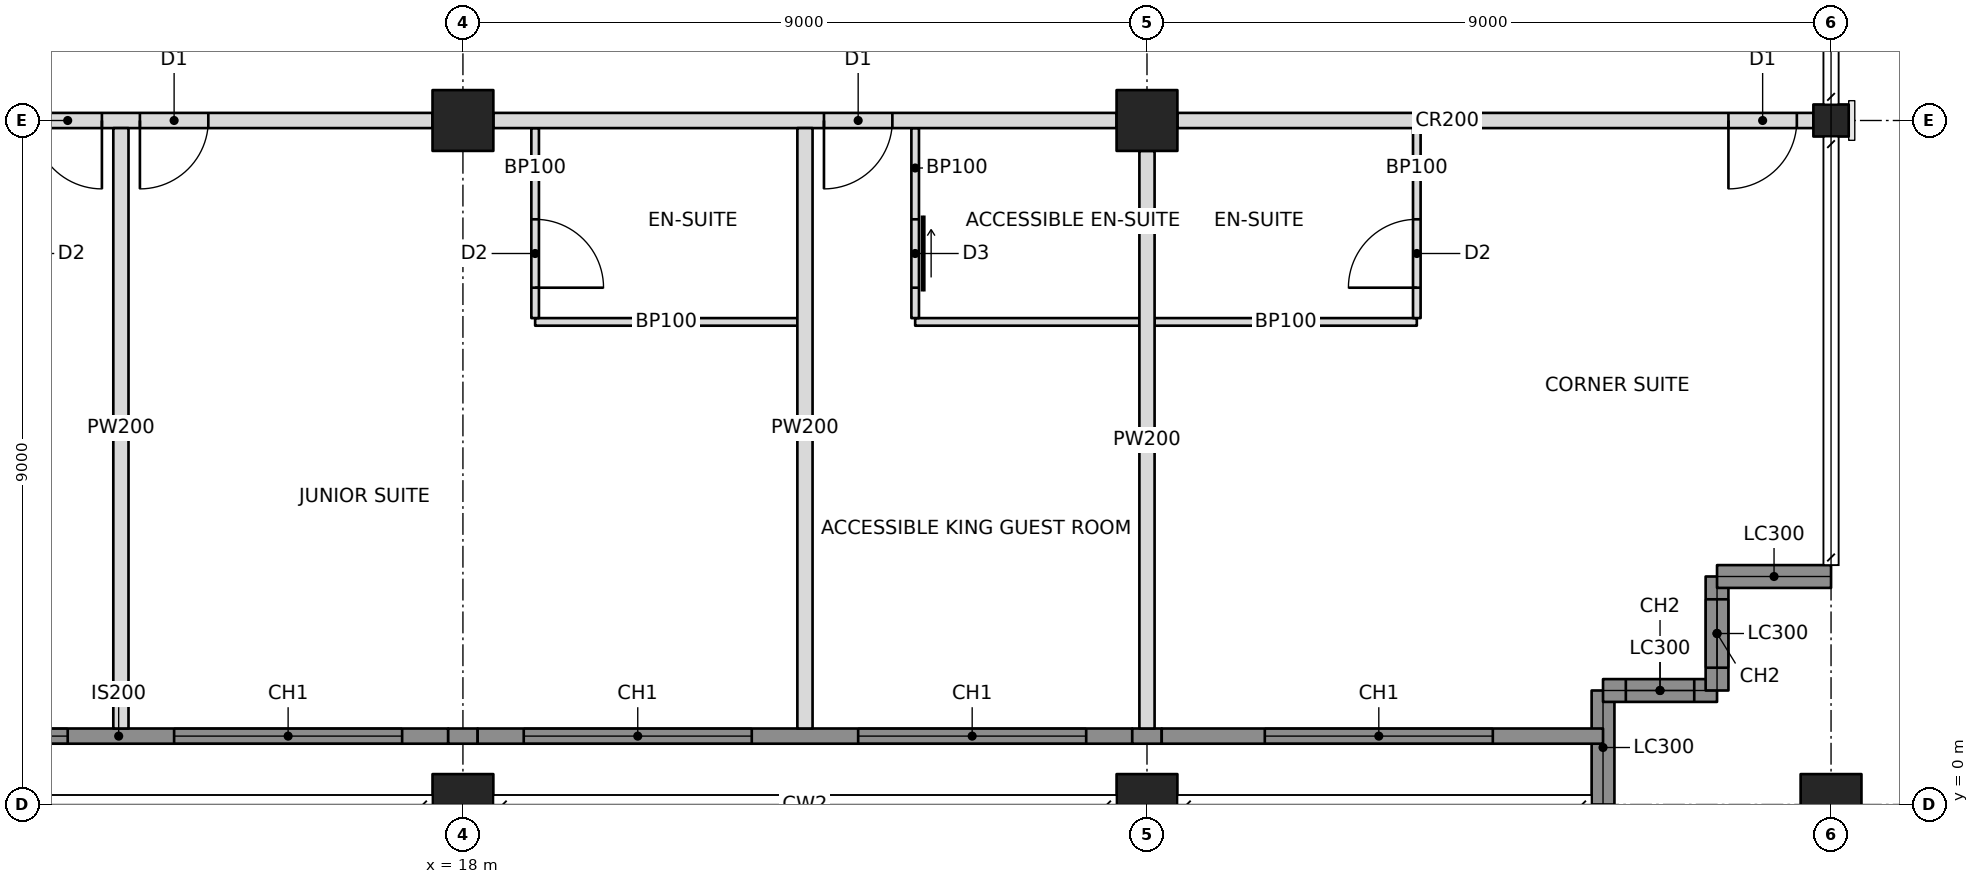
"""IFC4 building model, lengths in metres.
Left out: names, types, materials, properties, quantities, classifications, styles, units other than length and angle.
Written with IfcOpenShell. Run it as: python <this file> out.ifc"""

import sys

from ifc_helpers import new_model, si_unit, direction, frame, frame_2d, origin, origin_2d, place, context, subcontext, project, spatial, rectangle, hollow_rectangle, i_section, extrude, element, fill, save


model = new_model("IFC4")
c1 = context("Model", 3, precision=1e-05, world=origin(), true_north=direction((0.0, 1.0)))
c2 = subcontext(c1, "Body", "Model", "MODEL_VIEW")
j1 = project(units=[si_unit("LENGTHUNIT", "METRE"), si_unit("PLANEANGLEUNIT", "RADIAN")], contexts=[c1])
p1 = place(None, origin())
s1 = spatial("IfcSite", under=j1, at=p1, CompositionType="ELEMENT")
p2 = place(p1, origin())
s2 = spatial("IfcBuilding", under=s1, at=p2, CompositionType="ELEMENT")
p3 = place(p2, frame((0.0, 0.0, 230.2)))
s3 = spatial("IfcBuildingStorey", under=s2, at=p3, CompositionType="ELEMENT", Elevation=230.2)
p4 = place(p3, frame((18.0, 0.0, 0.0), z_axis=(0.0, 0.0, 1.0), x_axis=(1.0, 0.0, 0.0)))
e1 = element("IfcColumn", 1, at=p4, inside=s3, PredefinedType="COLUMN", context=c2, shape_type="SweptSolid", body=[
    extrude(hollow_rectangle(XDim=0.8, YDim=0.8, WallThickness=0.05, at=origin_2d()), origin(), (0.0, 0.0, 1.0), 3.6),
])
p5 = place(p3, frame((18.0, 9.0, 0.0), z_axis=(0.0, 0.0, 1.0), x_axis=(1.0, 0.0, 0.0)))
e2 = element("IfcColumn", 2, at=p5, inside=s3, PredefinedType="COLUMN", context=c2, shape_type="SweptSolid", body=[
    extrude(hollow_rectangle(XDim=0.8, YDim=0.8, WallThickness=0.1, at=origin_2d()), origin(), (0.0, 0.0, 1.0), 3.6),
])
p6 = place(p3, frame((27.0, 0.0, 0.0), z_axis=(0.0, 0.0, 1.0), x_axis=(1.0, 0.0, 0.0)))
e3 = element("IfcColumn", 3, at=p6, inside=s3, PredefinedType="COLUMN", context=c2, shape_type="SweptSolid", body=[
    extrude(hollow_rectangle(XDim=0.8, YDim=0.8, WallThickness=0.05, at=origin_2d()), origin(), (0.0, 0.0, 1.0), 3.6),
])
p7 = place(p3, frame((27.0, 9.0, 0.0), z_axis=(0.0, 0.0, 1.0), x_axis=(1.0, 0.0, 0.0)))
e4 = element("IfcColumn", 4, at=p7, inside=s3, PredefinedType="COLUMN", context=c2, shape_type="SweptSolid", body=[
    extrude(hollow_rectangle(XDim=0.8, YDim=0.8, WallThickness=0.1, at=origin_2d()), origin(), (0.0, 0.0, 1.0), 3.6),
])
p8 = place(p3, frame((36.0, 0.0, 0.0), z_axis=(0.0, 0.0, 1.0), x_axis=(1.0, 0.0, 0.0)))
e5 = element("IfcColumn", 5, at=p8, inside=s3, PredefinedType="COLUMN", context=c2, shape_type="SweptSolid", body=[
    extrude(hollow_rectangle(XDim=0.8, YDim=0.8, WallThickness=0.05, at=origin_2d()), origin(), (0.0, 0.0, 1.0), 3.6),
])
p9 = place(p3, frame((36.0, 9.0, 0.0), z_axis=(0.0, 0.0, 1.0), x_axis=(0.0, 1.0, 0.0)))
e6 = element("IfcColumn", 6, at=p9, inside=s3, PredefinedType="COLUMN", context=c2, shape_type="SweptSolid", body=[
    extrude(i_section(OverallWidth=0.422, OverallDepth=0.465, WebThickness=0.045, FlangeThickness=0.073, at=origin_2d()), origin(), (0.0, 0.0, 1.0), 3.6),
])
p10 = place(p3, frame((33.0, 0.0, 0.0), z_axis=(0.0, 0.0, 1.0), x_axis=(0.0, 1.0, 0.0)))
e7 = element("IfcWall", 7, at=p10, inside=s3, PredefinedType="SOLIDWALL", context=c2, shape_type="SweptSolid", body=[
    extrude(rectangle(XDim=1.5, YDim=0.3, at=frame_2d((0.75, 0.0))), origin(), (0.0, 0.0, 1.0), 2.62),
])
p11 = place(p3, frame((33.0, 1.5, 0.0), z_axis=(0.0, 0.0, 1.0), x_axis=(1.0, 0.0, 0.0)))
e8 = element("IfcWall", 8, at=p11, inside=s3, PredefinedType="SOLIDWALL", context=c2, shape_type="SweptSolid", body=[
    extrude(rectangle(XDim=1.5, YDim=0.3, at=frame_2d((0.75, 0.0))), origin(), (0.0, 0.0, 1.0), 3.4),
])
p12 = place(p11, frame((0.3, 0.0, 0.6)))
e9 = element("IfcOpeningElement", 9, at=p12, cuts=e8, PredefinedType="OPENING", context=c2, shape_type="SweptSolid", body=[
    extrude(rectangle(XDim=0.9, YDim=2.2, at=frame_2d((0.45, 1.1))), frame((0.0, 0.16, 0.0), z_axis=(0.0, -1.0, 0.0), x_axis=(1.0, 0.0, 0.0)), (0.0, 0.0, 1.0), 0.32),
])
p13 = place(p3, frame((34.5, 1.5, 0.0), z_axis=(0.0, 0.0, 1.0), x_axis=(0.0, 1.0, 0.0)))
e10 = element("IfcWall", 10, at=p13, inside=s3, PredefinedType="SOLIDWALL", context=c2, shape_type="SweptSolid", body=[
    extrude(rectangle(XDim=1.5, YDim=0.3, at=frame_2d((0.75, 0.0))), origin(), (0.0, 0.0, 1.0), 3.4),
])
p14 = place(p13, frame((0.3, 0.0, 0.6)))
e11 = element("IfcOpeningElement", 11, at=p14, cuts=e10, PredefinedType="OPENING", context=c2, shape_type="SweptSolid", body=[
    extrude(rectangle(XDim=0.9, YDim=2.2, at=frame_2d((0.45, 1.1))), frame((0.0, 0.16, 0.0), z_axis=(0.0, -1.0, 0.0), x_axis=(1.0, 0.0, 0.0)), (0.0, 0.0, 1.0), 0.32),
])
p15 = place(p3, frame((34.5, 3.0, 0.0), z_axis=(0.0, 0.0, 1.0), x_axis=(1.0, 0.0, 0.0)))
e12 = element("IfcWall", 12, at=p15, inside=s3, PredefinedType="SOLIDWALL", context=c2, shape_type="SweptSolid", body=[
    extrude(rectangle(XDim=1.5, YDim=0.3, at=frame_2d((0.75, 0.0))), origin(), (0.0, 0.0, 1.0), 2.62),
])
p16 = place(p3, frame((9.4, 9.0, 0.0), z_axis=(0.0, 0.0, 1.0), x_axis=(1.0, 0.0, 0.0)))
e13 = element("IfcWall", 13, at=p16, inside=s3, PredefinedType="PARTITIONING", context=c2, shape_type="SweptSolid", body=[
    extrude(rectangle(XDim=8.2, YDim=0.2, at=frame_2d((4.1, 0.0))), origin(), (0.0, 0.0, 1.0), 2.605),
])
p17 = place(p16, frame((2.95, 0.0, 0.0)))
e14 = element("IfcOpeningElement", 14, at=p17, cuts=e13, PredefinedType="OPENING", context=c2, shape_type="SweptSolid", body=[
    extrude(rectangle(XDim=0.9, YDim=2.1, at=frame_2d((0.45, 1.05))), frame((0.0, 0.11, 0.0), z_axis=(0.0, -1.0, 0.0), x_axis=(1.0, 0.0, 0.0)), (0.0, 0.0, 1.0), 0.22),
])
p18 = place(p16, frame((4.35, 0.0, 0.0)))
e15 = element("IfcOpeningElement", 15, at=p18, cuts=e13, PredefinedType="OPENING", context=c2, shape_type="SweptSolid", body=[
    extrude(rectangle(XDim=0.9, YDim=2.1, at=frame_2d((0.45, 1.05))), frame((0.0, 0.11, 0.0), z_axis=(0.0, -1.0, 0.0), x_axis=(1.0, 0.0, 0.0)), (0.0, 0.0, 1.0), 0.22),
])
p19 = place(p3, frame((18.4, 9.0, 0.0), z_axis=(0.0, 0.0, 1.0), x_axis=(1.0, 0.0, 0.0)))
e16 = element("IfcWall", 16, at=p19, inside=s3, PredefinedType="PARTITIONING", context=c2, shape_type="SweptSolid", body=[
    extrude(rectangle(XDim=8.2, YDim=0.2, at=frame_2d((4.1, 0.0))), origin(), (0.0, 0.0, 1.0), 2.605),
])
p20 = place(p19, frame((4.35, 0.0, 0.0)))
e17 = element("IfcOpeningElement", 17, at=p20, cuts=e16, PredefinedType="OPENING", context=c2, shape_type="SweptSolid", body=[
    extrude(rectangle(XDim=0.9, YDim=2.1, at=frame_2d((0.45, 1.05))), frame((0.0, 0.11, 0.0), z_axis=(0.0, -1.0, 0.0), x_axis=(1.0, 0.0, 0.0)), (0.0, 0.0, 1.0), 0.22),
])
p21 = place(p3, frame((27.4, 9.0, 0.0), z_axis=(0.0, 0.0, 1.0), x_axis=(1.0, 0.0, 0.0)))
e18 = element("IfcWall", 18, at=p21, inside=s3, PredefinedType="PARTITIONING", context=c2, shape_type="SweptSolid", body=[
    extrude(rectangle(XDim=8.368, YDim=0.2, at=frame_2d((4.184, 0.0))), origin(), (0.0, 0.0, 1.0), 2.605),
])
p22 = place(p21, frame((7.25, 0.0, 0.0)))
e19 = element("IfcOpeningElement", 19, at=p22, cuts=e18, PredefinedType="OPENING", context=c2, shape_type="SweptSolid", body=[
    extrude(rectangle(XDim=0.9, YDim=2.1, at=frame_2d((0.45, 1.05))), frame((0.0, 0.11, 0.0), z_axis=(0.0, -1.0, 0.0), x_axis=(1.0, 0.0, 0.0)), (0.0, 0.0, 1.0), 0.22),
])
for number, where, z_axis, x_axis in (
    (20, (13.5, 8.9, 0.0), (0.0, 0.0, 1.0), (0.0, -1.0, 0.0)),
    (21, (22.5, 8.9, 0.0), (0.0, 0.0, 1.0), (0.0, -1.0, 0.0)),
):
    element("IfcWall", number, at=place(p3, frame(where, z_axis=z_axis, x_axis=x_axis)), inside=s3, PredefinedType="PARTITIONING", context=c2, shape_type="SweptSolid", body=[
        extrude(rectangle(XDim=7.9, YDim=0.2, at=frame_2d((3.95, 0.0))), origin(), (0.0, 0.0, 1.0), 2.604),
    ])
p23 = place(p3, frame((27.0, 8.6, 0.0), z_axis=(0.0, 0.0, 1.0), x_axis=(0.0, -1.0, 0.0)))
e22 = element("IfcWall", 22, at=p23, inside=s3, PredefinedType="PARTITIONING", context=c2, shape_type="SweptSolid", body=[
    extrude(rectangle(XDim=7.6, YDim=0.2, at=frame_2d((3.8, 0.0))), origin(), (0.0, 0.0, 1.0), 2.605),
])
p24 = place(p3, frame((18.95, 6.35, 0.0), z_axis=(0.0, 0.0, 1.0), x_axis=(1.0, 0.0, 0.0)))
e23 = element("IfcWall", 23, at=p24, inside=s3, PredefinedType="PARTITIONING", context=c2, shape_type="SweptSolid", body=[
    extrude(rectangle(XDim=3.45, YDim=0.1, at=frame_2d((1.725, 0.0))), origin(), (0.0, 0.0, 1.0), 3.4),
])
p25 = place(p3, frame((18.95, 8.9, 0.0), z_axis=(0.0, 0.0, 1.0), x_axis=(0.0, -1.0, 0.0)))
e24 = element("IfcWall", 24, at=p25, inside=s3, PredefinedType="PARTITIONING", context=c2, shape_type="SweptSolid", body=[
    extrude(rectangle(XDim=2.5, YDim=0.1, at=frame_2d((1.25, 0.0))), origin(), (0.0, 0.0, 1.0), 2.604),
])
p26 = place(p25, frame((1.2, 0.0, 0.0)))
e25 = element("IfcOpeningElement", 25, at=p26, cuts=e24, PredefinedType="OPENING", context=c2, shape_type="SweptSolid", body=[
    extrude(rectangle(XDim=0.9, YDim=2.1, at=frame_2d((0.45, 1.05))), frame((0.0, 0.06, 0.0), z_axis=(0.0, -1.0, 0.0), x_axis=(1.0, 0.0, 0.0)), (0.0, 0.0, 1.0), 0.12),
])
p27 = place(p3, frame((23.95, 6.35, 0.0), z_axis=(0.0, 0.0, 1.0), x_axis=(1.0, 0.0, 0.0)))
e26 = element("IfcWall", 26, at=p27, inside=s3, PredefinedType="PARTITIONING", context=c2, shape_type="SweptSolid", body=[
    extrude(rectangle(XDim=2.95, YDim=0.1, at=frame_2d((1.475, 0.0))), origin(), (0.0, 0.0, 1.0), 2.604),
])
p28 = place(p3, frame((23.95, 8.9, 0.0), z_axis=(0.0, 0.0, 1.0), x_axis=(0.0, -1.0, 0.0)))
e27 = element("IfcWall", 27, at=p28, inside=s3, PredefinedType="PARTITIONING", context=c2, shape_type="SweptSolid", body=[
    extrude(rectangle(XDim=2.5, YDim=0.1, at=frame_2d((1.25, 0.0))), origin(), (0.0, 0.0, 1.0), 2.604),
])
p29 = place(p28, frame((1.2, 0.0, 0.0)))
e28 = element("IfcOpeningElement", 28, at=p29, cuts=e27, PredefinedType="OPENING", context=c2, shape_type="SweptSolid", body=[
    extrude(rectangle(XDim=0.9, YDim=2.1, at=frame_2d((0.45, 1.05))), frame((0.0, 0.06, 0.0), z_axis=(0.0, -1.0, 0.0), x_axis=(1.0, 0.0, 0.0)), (0.0, 0.0, 1.0), 0.12),
])
p30 = place(p3, frame((27.1, 6.35, 0.0), z_axis=(0.0, 0.0, 1.0), x_axis=(1.0, 0.0, 0.0)))
e29 = element("IfcWall", 29, at=p30, inside=s3, PredefinedType="PARTITIONING", context=c2, shape_type="SweptSolid", body=[
    extrude(rectangle(XDim=3.45, YDim=0.1, at=frame_2d((1.725, 0.0))), origin(), (0.0, 0.0, 1.0), 2.604),
])
p31 = place(p3, frame((30.55, 8.9, 0.0), z_axis=(0.0, 0.0, 1.0), x_axis=(0.0, -1.0, 0.0)))
e30 = element("IfcWall", 30, at=p31, inside=s3, PredefinedType="PARTITIONING", context=c2, shape_type="SweptSolid", body=[
    extrude(rectangle(XDim=2.5, YDim=0.1, at=frame_2d((1.25, 0.0))), origin(), (0.0, 0.0, 1.0), 2.604),
])
p32 = place(p31, frame((1.2, 0.0, 0.0)))
e31 = element("IfcOpeningElement", 31, at=p32, cuts=e30, PredefinedType="OPENING", context=c2, shape_type="SweptSolid", body=[
    extrude(rectangle(XDim=0.9, YDim=2.1, at=frame_2d((0.45, 1.05))), frame((0.0, 0.06, 0.0), z_axis=(0.0, -1.0, 0.0), x_axis=(1.0, 0.0, 0.0)), (0.0, 0.0, 1.0), 0.12),
])
p33 = place(p3, frame((9.135, 0.9, 0.0), z_axis=(0.0, 0.0, 1.0), x_axis=(1.0, 0.0, 0.0)))
e32 = element("IfcWall", 32, at=p33, inside=s3, PredefinedType="SOLIDWALL", context=c2, shape_type="SweptSolid", body=[
    extrude(rectangle(XDim=8.671, YDim=0.2, at=frame_2d((4.335, 0.0))), origin(), (0.0, 0.0, 1.0), 3.4),
])
p34 = place(p33, frame((0.665, 0.0, 0.6)))
e33 = element("IfcOpeningElement", 33, at=p34, cuts=e32, PredefinedType="OPENING", context=c2, shape_type="SweptSolid", body=[
    extrude(rectangle(XDim=3.0, YDim=2.2, at=frame_2d((1.5, 1.1))), frame((0.0, 0.11, 0.0), z_axis=(0.0, -1.0, 0.0), x_axis=(1.0, 0.0, 0.0)), (0.0, 0.0, 1.0), 0.22),
])
p35 = place(p33, frame((5.065, 0.0, 0.6)))
e34 = element("IfcOpeningElement", 34, at=p35, cuts=e32, PredefinedType="OPENING", context=c2, shape_type="SweptSolid", body=[
    extrude(rectangle(XDim=3.0, YDim=2.2, at=frame_2d((1.5, 1.1))), frame((0.0, 0.11, 0.0), z_axis=(0.0, -1.0, 0.0), x_axis=(1.0, 0.0, 0.0)), (0.0, 0.0, 1.0), 0.22),
])
p36 = place(p3, frame((17.806, 0.9, 0.0), z_axis=(0.0, 0.0, 1.0), x_axis=(1.0, 0.0, 0.0)))
e35 = element("IfcWall", 35, at=p36, inside=s3, PredefinedType="SOLIDWALL", context=c2, shape_type="SweptSolid", body=[
    extrude(rectangle(XDim=0.388, YDim=0.2, at=frame_2d((0.194, 0.0))), origin(), (0.0, 0.0, 1.0), 2.604),
])
p37 = place(p3, frame((18.194, 0.9, 0.0), z_axis=(0.0, 0.0, 1.0), x_axis=(1.0, 0.0, 0.0)))
e36 = element("IfcWall", 36, at=p37, inside=s3, PredefinedType="SOLIDWALL", context=c2, shape_type="SweptSolid", body=[
    extrude(rectangle(XDim=8.612, YDim=0.2, at=frame_2d((4.306, 0.0))), origin(), (0.0, 0.0, 1.0), 3.4),
])
p38 = place(p37, frame((0.606, 0.0, 0.6)))
e37 = element("IfcOpeningElement", 37, at=p38, cuts=e36, PredefinedType="OPENING", context=c2, shape_type="SweptSolid", body=[
    extrude(rectangle(XDim=3.0, YDim=2.2, at=frame_2d((1.5, 1.1))), frame((0.0, 0.11, 0.0), z_axis=(0.0, -1.0, 0.0), x_axis=(1.0, 0.0, 0.0)), (0.0, 0.0, 1.0), 0.22),
])
p39 = place(p37, frame((5.006, 0.0, 0.6)))
e38 = element("IfcOpeningElement", 38, at=p39, cuts=e36, PredefinedType="OPENING", context=c2, shape_type="SweptSolid", body=[
    extrude(rectangle(XDim=3.0, YDim=2.2, at=frame_2d((1.5, 1.1))), frame((0.0, 0.11, 0.0), z_axis=(0.0, -1.0, 0.0), x_axis=(1.0, 0.0, 0.0)), (0.0, 0.0, 1.0), 0.22),
])
p40 = place(p3, frame((26.806, 0.9, 0.0), z_axis=(0.0, 0.0, 1.0), x_axis=(1.0, 0.0, 0.0)))
e39 = element("IfcWall", 39, at=p40, inside=s3, PredefinedType="SOLIDWALL", context=c2, shape_type="SweptSolid", body=[
    extrude(rectangle(XDim=0.388, YDim=0.2, at=frame_2d((0.194, 0.0))), origin(), (0.0, 0.0, 1.0), 2.604),
])
p41 = place(p3, frame((27.194, 0.9, 0.0), z_axis=(0.0, 0.0, 1.0), x_axis=(1.0, 0.0, 0.0)))
e40 = element("IfcWall", 40, at=p41, inside=s3, PredefinedType="SOLIDWALL", context=c2, shape_type="SweptSolid", body=[
    extrude(rectangle(XDim=5.806, YDim=0.2, at=frame_2d((2.903, 0.0))), origin(), (0.0, 0.0, 1.0), 3.4),
])
p42 = place(p41, frame((1.356, 0.0, 0.6)))
e41 = element("IfcOpeningElement", 41, at=p42, cuts=e40, PredefinedType="OPENING", context=c2, shape_type="SweptSolid", body=[
    extrude(rectangle(XDim=3.0, YDim=2.2, at=frame_2d((1.5, 1.1))), frame((0.0, 0.11, 0.0), z_axis=(0.0, -1.0, 0.0), x_axis=(1.0, 0.0, 0.0)), (0.0, 0.0, 1.0), 0.22),
])
p43 = place(p12, origin())
e42 = element("IfcWindow", 42, at=p43, inside=s3, PartitioningType="SINGLE_PANEL", PredefinedType="WINDOW", context=c2, shape_type="SweptSolid", body=[
    extrude(rectangle(XDim=0.9, YDim=2.2, at=frame_2d((0.45, 1.1))), frame((0.0, 0.03, 0.0), z_axis=(0.0, -1.0, 0.0), x_axis=(1.0, 0.0, 0.0)), (0.0, 0.0, 1.0), 0.06),
])
fill(e9, e42)
p44 = place(p14, origin())
e43 = element("IfcWindow", 43, at=p44, inside=s3, PartitioningType="SINGLE_PANEL", PredefinedType="WINDOW", context=c2, shape_type="SweptSolid", body=[
    extrude(rectangle(XDim=0.9, YDim=2.2, at=frame_2d((0.45, 1.1))), frame((0.0, 0.03, 0.0), z_axis=(0.0, -1.0, 0.0), x_axis=(1.0, 0.0, 0.0)), (0.0, 0.0, 1.0), 0.06),
])
fill(e11, e43)
p45 = place(p34, origin())
e44 = element("IfcWindow", 44, at=p45, inside=s3, PartitioningType="TRIPLE_PANEL_VERTICAL", PredefinedType="WINDOW", context=c2, shape_type="SweptSolid", body=[
    extrude(rectangle(XDim=3.0, YDim=2.2, at=frame_2d((1.5, 1.1))), frame((0.0, 0.03, 0.0), z_axis=(0.0, -1.0, 0.0), x_axis=(1.0, 0.0, 0.0)), (0.0, 0.0, 1.0), 0.06),
])
fill(e33, e44)
p46 = place(p35, origin())
e45 = element("IfcWindow", 45, at=p46, inside=s3, PartitioningType="TRIPLE_PANEL_VERTICAL", PredefinedType="WINDOW", context=c2, shape_type="SweptSolid", body=[
    extrude(rectangle(XDim=3.0, YDim=2.2, at=frame_2d((1.5, 1.1))), frame((0.0, 0.03, 0.0), z_axis=(0.0, -1.0, 0.0), x_axis=(1.0, 0.0, 0.0)), (0.0, 0.0, 1.0), 0.06),
])
fill(e34, e45)
p47 = place(p38, origin())
e46 = element("IfcWindow", 46, at=p47, inside=s3, PartitioningType="TRIPLE_PANEL_VERTICAL", PredefinedType="WINDOW", context=c2, shape_type="SweptSolid", body=[
    extrude(rectangle(XDim=3.0, YDim=2.2, at=frame_2d((1.5, 1.1))), frame((0.0, 0.03, 0.0), z_axis=(0.0, -1.0, 0.0), x_axis=(1.0, 0.0, 0.0)), (0.0, 0.0, 1.0), 0.06),
])
fill(e37, e46)
p48 = place(p39, origin())
e47 = element("IfcWindow", 47, at=p48, inside=s3, PartitioningType="TRIPLE_PANEL_VERTICAL", PredefinedType="WINDOW", context=c2, shape_type="SweptSolid", body=[
    extrude(rectangle(XDim=3.0, YDim=2.2, at=frame_2d((1.5, 1.1))), frame((0.0, 0.03, 0.0), z_axis=(0.0, -1.0, 0.0), x_axis=(1.0, 0.0, 0.0)), (0.0, 0.0, 1.0), 0.06),
])
fill(e38, e47)
p49 = place(p42, origin())
e48 = element("IfcWindow", 48, at=p49, inside=s3, PartitioningType="TRIPLE_PANEL_VERTICAL", PredefinedType="WINDOW", context=c2, shape_type="SweptSolid", body=[
    extrude(rectangle(XDim=3.0, YDim=2.2, at=frame_2d((1.5, 1.1))), frame((0.0, 0.03, 0.0), z_axis=(0.0, -1.0, 0.0), x_axis=(1.0, 0.0, 0.0)), (0.0, 0.0, 1.0), 0.06),
])
fill(e41, e48)
p50 = place(p17, frame((0.9, 0.0, 0.0), z_axis=(0.0, 0.0, 1.0), x_axis=(-1.0, 0.0, 0.0)))
e49 = element("IfcDoor", 49, at=p50, inside=s3, OperationType="SINGLE_SWING_LEFT", PredefinedType="DOOR", context=c2, shape_type="SweptSolid", body=[
    extrude(rectangle(XDim=0.9, YDim=2.1, at=frame_2d((0.45, 1.05))), frame((0.0, 0.025, 0.0), z_axis=(0.0, -1.0, 0.0), x_axis=(1.0, 0.0, 0.0)), (0.0, 0.0, 1.0), 0.05),
])
fill(e14, e49)
p51 = place(p26, origin())
e50 = element("IfcDoor", 50, at=p51, inside=s3, OperationType="SINGLE_SWING_RIGHT", PredefinedType="DOOR", context=c2, shape_type="SweptSolid", body=[
    extrude(rectangle(XDim=0.9, YDim=2.1, at=frame_2d((0.45, 1.05))), frame((0.0, 0.025, 0.0), z_axis=(0.0, -1.0, 0.0), x_axis=(1.0, 0.0, 0.0)), (0.0, 0.0, 1.0), 0.05),
])
fill(e25, e50)
p52 = place(p18, frame((0.9, 0.0, 0.0), z_axis=(0.0, 0.0, 1.0), x_axis=(-1.0, 0.0, 0.0)))
e51 = element("IfcDoor", 51, at=p52, inside=s3, OperationType="SINGLE_SWING_RIGHT", PredefinedType="DOOR", context=c2, shape_type="SweptSolid", body=[
    extrude(rectangle(XDim=0.9, YDim=2.1, at=frame_2d((0.45, 1.05))), frame((0.0, 0.025, 0.0), z_axis=(0.0, -1.0, 0.0), x_axis=(1.0, 0.0, 0.0)), (0.0, 0.0, 1.0), 0.05),
])
fill(e15, e51)
p53 = place(p29, origin())
e52 = element("IfcDoor", 52, at=p53, inside=s3, OperationType="SLIDING_TO_LEFT", PredefinedType="DOOR", context=c2, shape_type="SweptSolid", body=[
    extrude(rectangle(XDim=0.9, YDim=2.1, at=frame_2d((0.45, 1.05))), frame((0.0, 0.025, 0.0), z_axis=(0.0, -1.0, 0.0), x_axis=(1.0, 0.0, 0.0)), (0.0, 0.0, 1.0), 0.05),
])
fill(e28, e52)
p54 = place(p20, frame((0.9, 0.0, 0.0), z_axis=(0.0, 0.0, 1.0), x_axis=(-1.0, 0.0, 0.0)))
e53 = element("IfcDoor", 53, at=p54, inside=s3, OperationType="SINGLE_SWING_RIGHT", PredefinedType="DOOR", context=c2, shape_type="SweptSolid", body=[
    extrude(rectangle(XDim=0.9, YDim=2.1, at=frame_2d((0.45, 1.05))), frame((0.0, 0.025, 0.0), z_axis=(0.0, -1.0, 0.0), x_axis=(1.0, 0.0, 0.0)), (0.0, 0.0, 1.0), 0.05),
])
fill(e17, e53)
p55 = place(p32, frame((0.9, 0.0, 0.0), z_axis=(0.0, 0.0, 1.0), x_axis=(-1.0, 0.0, 0.0)))
e54 = element("IfcDoor", 54, at=p55, inside=s3, OperationType="SINGLE_SWING_LEFT", PredefinedType="DOOR", context=c2, shape_type="SweptSolid", body=[
    extrude(rectangle(XDim=0.9, YDim=2.1, at=frame_2d((0.45, 1.05))), frame((0.0, 0.025, 0.0), z_axis=(0.0, -1.0, 0.0), x_axis=(1.0, 0.0, 0.0)), (0.0, 0.0, 1.0), 0.05),
])
fill(e31, e54)
p56 = place(p22, frame((0.9, 0.0, 0.0), z_axis=(0.0, 0.0, 1.0), x_axis=(-1.0, 0.0, 0.0)))
e55 = element("IfcDoor", 55, at=p56, inside=s3, OperationType="SINGLE_SWING_RIGHT", PredefinedType="DOOR", context=c2, shape_type="SweptSolid", body=[
    extrude(rectangle(XDim=0.9, YDim=2.1, at=frame_2d((0.45, 1.05))), frame((0.0, 0.025, 0.0), z_axis=(0.0, -1.0, 0.0), x_axis=(1.0, 0.0, 0.0)), (0.0, 0.0, 1.0), 0.05),
])
fill(e19, e55)
save(model, sys.argv[1])
